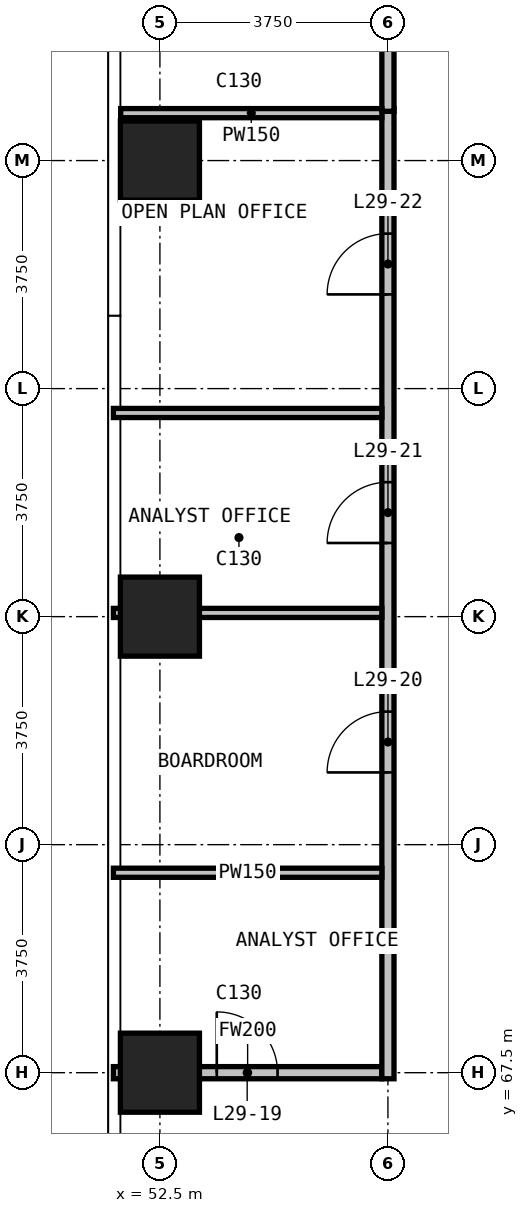
"""IFC4 building model, lengths in metres.
Left out: names, types, materials, properties, quantities, classifications, styles, units other than length and angle.
Written with IfcOpenShell. Run it as: python <this file> out.ifc"""

import sys

from ifc_helpers import new_model, si_unit, direction, frame, frame_2d, origin, origin_2d, place, context, subcontext, project, spatial, rectangle, extrude, element, fill, save


model = new_model("IFC4")
c1 = context("Model", 3, precision=1e-05, world=origin(), true_north=direction((0.0, 1.0)))
c2 = subcontext(c1, "Body", "Model", "MODEL_VIEW")
j1 = project(units=[si_unit("LENGTHUNIT", "METRE"), si_unit("PLANEANGLEUNIT", "RADIAN")], contexts=[c1])
p1 = place(None, origin())
s1 = spatial("IfcSite", under=j1, at=p1, CompositionType="ELEMENT")
p2 = place(p1, origin())
s2 = spatial("IfcBuilding", under=s1, at=p2, CompositionType="ELEMENT")
p3 = place(p2, frame((0.0, 0.0, 118.0)))
s3 = spatial("IfcBuildingStorey", under=s2, at=p3, CompositionType="ELEMENT", Elevation=118.0)
for number, where, z_axis, x_axis in (
    (1, (52.5, 67.5, 0.0), (0.0, 0.0, 1.0), (1.0, 0.0, 0.0)),
    (2, (52.5, 75.0, 0.0), (0.0, 0.0, 1.0), (1.0, 0.0, 0.0)),
    (3, (52.5, 82.5, 0.0), (0.0, 0.0, 1.0), (1.0, 0.0, 0.0)),
):
    element("IfcColumn", number, at=place(p3, frame(where, z_axis=z_axis, x_axis=x_axis)), inside=s3, PredefinedType="COLUMN", context=c2, shape_type="SweptSolid", body=[
        extrude(rectangle(XDim=1.3, YDim=1.3, at=origin_2d()), origin(), (0.0, 0.0, 1.0), 3.6),
    ])
p4 = place(p3, frame((51.735, 67.5, 0.0), z_axis=(0.0, 0.0, 1.0), x_axis=(1.0, 0.0, 0.0)))
e4 = element("IfcWall", 4, at=p4, inside=s3, PredefinedType="PARTITIONING", context=c2, shape_type="SweptSolid", body=[
    extrude(rectangle(XDim=4.415, YDim=0.2, at=frame_2d((2.208, 0.0))), origin(), (0.0, 0.0, 1.0), 3.3),
])
p5 = place(p4, frame((1.7, 0.0, 0.0)))
e5 = element("IfcOpeningElement", 5, at=p5, cuts=e4, PredefinedType="OPENING", context=c2, shape_type="SweptSolid", body=[
    extrude(rectangle(XDim=1.0, YDim=2.2, at=frame_2d((0.5, 1.1))), frame((0.0, 0.11, 0.0), z_axis=(0.0, -1.0, 0.0), x_axis=(1.0, 0.0, 0.0)), (0.0, 0.0, 1.0), 0.22),
])
p6 = place(p3, frame((56.25, 67.4, 0.0), z_axis=(0.0, 0.0, 1.0), x_axis=(0.0, 1.0, 0.0)))
e6 = element("IfcWall", 6, at=p6, inside=s3, PredefinedType="PARTITIONING", context=c2, shape_type="SweptSolid", body=[
    extrude(rectangle(XDim=15.955, YDim=0.2, at=frame_2d((7.978, 0.0))), origin(), (0.0, 0.0, 1.0), 3.3),
])
p7 = place(p6, frame((5.038, 0.0, 0.0)))
e7 = element("IfcOpeningElement", 7, at=p7, cuts=e6, PredefinedType="OPENING", context=c2, shape_type="SweptSolid", body=[
    extrude(rectangle(XDim=1.0, YDim=2.2, at=frame_2d((0.5, 1.1))), frame((0.0, 0.11, 0.0), z_axis=(0.0, -1.0, 0.0), x_axis=(1.0, 0.0, 0.0)), (0.0, 0.0, 1.0), 0.22),
])
p8 = place(p6, frame((8.811, 0.0, 0.0)))
e8 = element("IfcOpeningElement", 8, at=p8, cuts=e6, PredefinedType="OPENING", context=c2, shape_type="SweptSolid", body=[
    extrude(rectangle(XDim=1.0, YDim=2.2, at=frame_2d((0.5, 1.1))), frame((0.0, 0.11, 0.0), z_axis=(0.0, -1.0, 0.0), x_axis=(1.0, 0.0, 0.0)), (0.0, 0.0, 1.0), 0.22),
])
p9 = place(p6, frame((12.899, 0.0, 0.0)))
e9 = element("IfcOpeningElement", 9, at=p9, cuts=e6, PredefinedType="OPENING", context=c2, shape_type="SweptSolid", body=[
    extrude(rectangle(XDim=1.0, YDim=2.2, at=frame_2d((0.5, 1.1))), frame((0.0, 0.11, 0.0), z_axis=(0.0, -1.0, 0.0), x_axis=(1.0, 0.0, 0.0)), (0.0, 0.0, 1.0), 0.22),
])
p10 = place(p3, frame((56.25, 83.31, 0.0), z_axis=(0.0, 0.0, 1.0), x_axis=(0.0, 1.0, 0.0)))
e10 = element("IfcWall", 10, at=p10, inside=s3, PredefinedType="PARTITIONING", context=c2, shape_type="SweptSolid", body=[
    extrude(rectangle(XDim=7.335, YDim=0.2, at=frame_2d((3.667, 0.0))), origin(), (0.0, 0.0, 1.0), 3.3),
])
for number, where, z_axis, x_axis in (
    (11, (51.735, 70.788, 0.0), (0.0, 0.0, 1.0), (1.0, 0.0, 0.0)),
    (12, (51.735, 75.061, 0.0), (0.0, 0.0, 1.0), (1.0, 0.0, 0.0)),
    (13, (51.735, 78.349, 0.0), (0.0, 0.0, 1.0), (1.0, 0.0, 0.0)),
):
    element("IfcWall", number, at=place(p3, frame(where, z_axis=z_axis, x_axis=x_axis)), inside=s3, PredefinedType="PARTITIONING", context=c2, shape_type="SweptSolid", body=[
        extrude(rectangle(XDim=4.415, YDim=0.15, at=frame_2d((2.208, 0.0))), origin(), (0.0, 0.0, 1.0), 3.3),
    ])
p11 = place(p3, frame((51.855, 83.28, 0.0), z_axis=(0.0, 0.0, 1.0), x_axis=(1.0, 0.0, 0.0)))
e14 = element("IfcWall", 14, at=p11, inside=s3, PredefinedType="PARTITIONING", context=c2, shape_type="SweptSolid", body=[
    extrude(rectangle(XDim=4.295, YDim=0.15, at=frame_2d((2.147, 0.0))), origin(), (0.0, 0.0, 1.0), 3.3),
])
p12 = place(p5, origin())
e15 = element("IfcDoor", 15, at=p12, inside=s3, OperationType="SINGLE_SWING_RIGHT", PredefinedType="DOOR", context=c2, shape_type="SweptSolid", body=[
    extrude(rectangle(XDim=1.0, YDim=2.2, at=frame_2d((0.5, 1.1))), frame((0.0, 0.025, 0.0), z_axis=(0.0, -1.0, 0.0), x_axis=(1.0, 0.0, 0.0)), (0.0, 0.0, 1.0), 0.05),
])
fill(e5, e15)
p13 = place(p7, origin())
e16 = element("IfcDoor", 16, at=p13, inside=s3, OperationType="SINGLE_SWING_LEFT", PredefinedType="DOOR", context=c2, shape_type="SweptSolid", body=[
    extrude(rectangle(XDim=1.0, YDim=2.2, at=frame_2d((0.5, 1.1))), frame((0.0, 0.025, 0.0), z_axis=(0.0, -1.0, 0.0), x_axis=(1.0, 0.0, 0.0)), (0.0, 0.0, 1.0), 0.05),
])
fill(e7, e16)
p14 = place(p8, origin())
e17 = element("IfcDoor", 17, at=p14, inside=s3, OperationType="SINGLE_SWING_RIGHT", PredefinedType="DOOR", context=c2, shape_type="SweptSolid", body=[
    extrude(rectangle(XDim=1.0, YDim=2.2, at=frame_2d((0.5, 1.1))), frame((0.0, 0.025, 0.0), z_axis=(0.0, -1.0, 0.0), x_axis=(1.0, 0.0, 0.0)), (0.0, 0.0, 1.0), 0.05),
])
fill(e8, e17)
p15 = place(p9, origin())
e18 = element("IfcDoor", 18, at=p15, inside=s3, OperationType="SINGLE_SWING_RIGHT", PredefinedType="DOOR", context=c2, shape_type="SweptSolid", body=[
    extrude(rectangle(XDim=1.0, YDim=2.2, at=frame_2d((0.5, 1.1))), frame((0.0, 0.025, 0.0), z_axis=(0.0, -1.0, 0.0), x_axis=(1.0, 0.0, 0.0)), (0.0, 0.0, 1.0), 0.05),
])
fill(e9, e18)
save(model, sys.argv[1])
